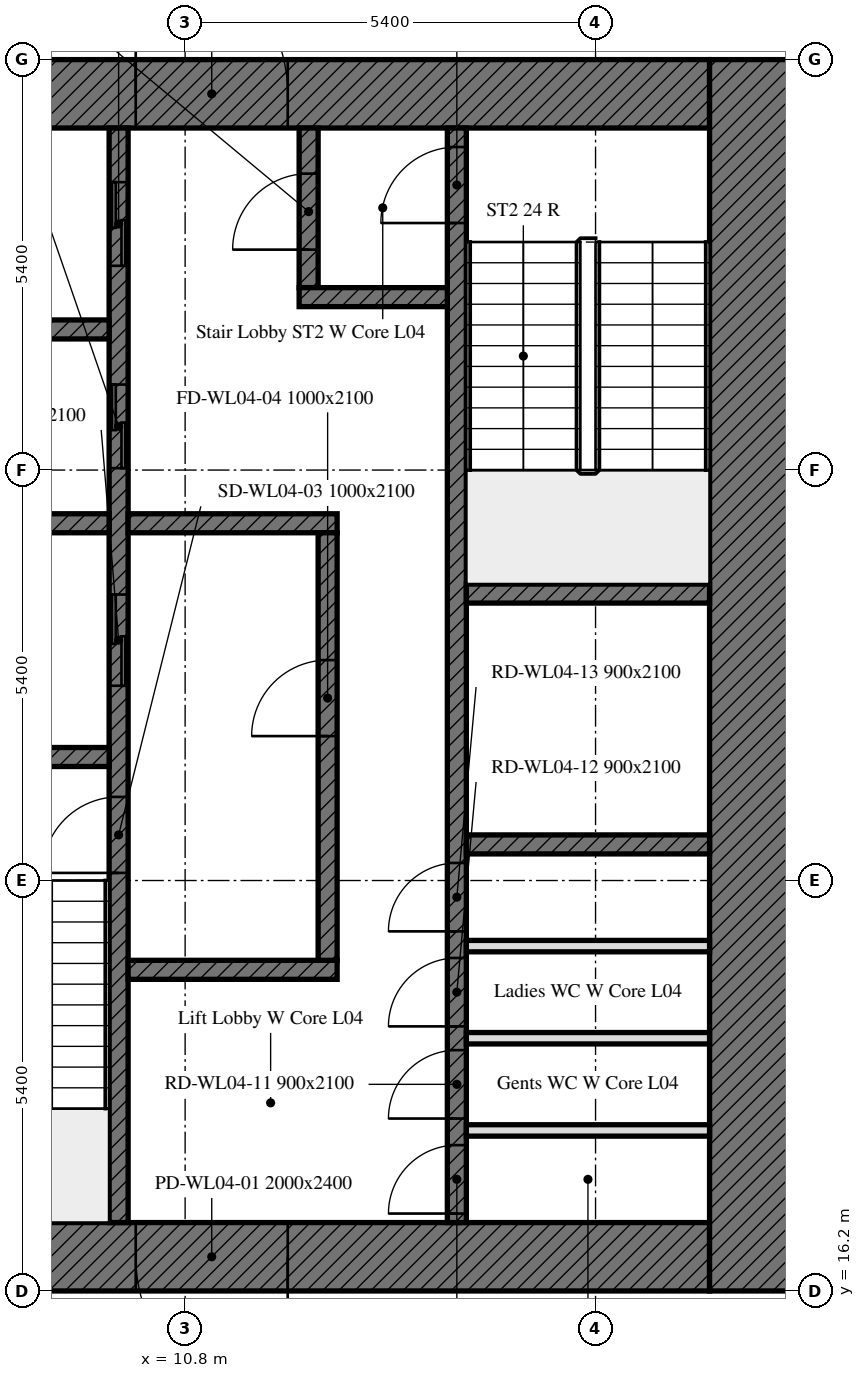
"""IFC4 building model, lengths in metres.
Left out: names, types, materials, properties, quantities, classifications, styles, units other than length and angle.
Written with IfcOpenShell. Run it as: python <this file> out.ifc"""

import sys

from ifc_helpers import new_model, si_unit, direction, frame, frame_2d, origin, place, context, subcontext, project, spatial, rectangle, extrude, element, fill, save


model = new_model("IFC4")
c1 = context("Model", 3, precision=1e-05, world=origin(), true_north=direction((0.0, 1.0)))
c2 = subcontext(c1, "Body", "Model", "MODEL_VIEW")
j1 = project(units=[si_unit("LENGTHUNIT", "METRE"), si_unit("PLANEANGLEUNIT", "RADIAN")], contexts=[c1])
p1 = place(None, origin())
s1 = spatial("IfcSite", under=j1, at=p1, CompositionType="ELEMENT")
p2 = place(p1, origin())
s2 = spatial("IfcBuilding", under=s1, at=p2, CompositionType="ELEMENT")
p3 = place(p2, frame((0.0, 0.0, 24.6)))
s3 = spatial("IfcBuildingStorey", under=s2, at=p3, CompositionType="ELEMENT", Elevation=24.6)
p4 = place(p3, frame((17.7, 16.65, 0.0), z_axis=(0.0, 0.0, 1.0), x_axis=(-1.0, 0.0, 0.0)))
e1 = element("IfcWall", 1, at=p4, inside=s3, PredefinedType="SOLIDWALL", context=c2, shape_type="SweptSolid", body=[
    extrude(rectangle(XDim=11.1, YDim=0.9, at=frame_2d((5.55, 0.0))), origin(), (0.0, 0.0, 1.0), 4.1),
])
p5 = place(p4, frame((5.55, 0.0, 0.0)))
e2 = element("IfcOpeningElement", 2, at=p5, cuts=e1, PredefinedType="OPENING", context=c2, shape_type="SweptSolid", body=[
    extrude(rectangle(XDim=2.0, YDim=2.4, at=frame_2d((1.0, 1.2))), frame((0.0, 0.45, 0.0), z_axis=(0.0, -1.0, 0.0), x_axis=(1.0, 0.0, 0.0)), (0.0, 0.0, 1.0), 0.9),
])
p6 = place(p3, frame((6.6, 31.95, 0.0), z_axis=(0.0, 0.0, 1.0), x_axis=(1.0, 0.0, 0.0)))
e3 = element("IfcWall", 3, at=p6, inside=s3, PredefinedType="SOLIDWALL", context=c2, shape_type="SweptSolid", body=[
    extrude(rectangle(XDim=11.1, YDim=0.9, at=frame_2d((5.55, 0.0))), origin(), (0.0, 0.0, 1.0), 4.1),
])
p7 = place(p6, frame((3.55, 0.0, 0.0)))
e4 = element("IfcOpeningElement", 4, at=p7, cuts=e3, PredefinedType="OPENING", context=c2, shape_type="SweptSolid", body=[
    extrude(rectangle(XDim=2.0, YDim=2.4, at=frame_2d((1.0, 1.2))), frame((0.0, 0.45, 0.0), z_axis=(0.0, -1.0, 0.0), x_axis=(1.0, 0.0, 0.0)), (0.0, 0.0, 1.0), 0.9),
])
p8 = place(p3, frame((18.3, 32.4, 0.0), z_axis=(0.0, 0.0, 1.0), x_axis=(0.0, -1.0, 0.0)))
e5 = element("IfcWall", 5, at=p8, inside=s3, PredefinedType="SOLIDWALL", context=c2, shape_type="SweptSolid", body=[
    extrude(rectangle(XDim=16.2, YDim=1.2, at=frame_2d((8.1, 0.0))), origin(), (0.0, 0.0, 1.0), 4.1),
])
p9 = place(p3, frame((9.925, 17.1, 0.0), z_axis=(0.0, 0.0, 1.0), x_axis=(0.0, 1.0, 0.0)))
e6 = element("IfcWall", 6, at=p9, inside=s3, PredefinedType="SOLIDWALL", context=c2, shape_type="SweptSolid", body=[
    extrude(rectangle(XDim=14.4, YDim=0.25, at=frame_2d((7.2, 0.0))), origin(), (0.0, 0.0, 1.0), 4.1),
])
p10 = place(p9, frame((4.6, 0.0, 0.0)))
e7 = element("IfcOpeningElement", 7, at=p10, cuts=e6, PredefinedType="OPENING", context=c2, shape_type="SweptSolid", body=[
    extrude(rectangle(XDim=1.0, YDim=2.1, at=frame_2d((0.5, 1.05))), frame((0.0, 0.125, 0.0), z_axis=(0.0, -1.0, 0.0), x_axis=(1.0, 0.0, 0.0)), (0.0, 0.0, 1.0), 0.25),
])
p11 = place(p9, frame((7.062, 0.0, 0.0)))
e8 = element("IfcOpeningElement", 8, at=p11, cuts=e6, PredefinedType="OPENING", context=c2, shape_type="SweptSolid", body=[
    extrude(rectangle(XDim=1.2, YDim=2.1, at=frame_2d((0.6, 1.05))), frame((0.0, 0.125, 0.0), z_axis=(0.0, -1.0, 0.0), x_axis=(1.0, 0.0, 0.0)), (0.0, 0.0, 1.0), 0.25),
])
p12 = place(p9, frame((9.925, 0.0, 0.0)))
e9 = element("IfcOpeningElement", 9, at=p12, cuts=e6, PredefinedType="OPENING", context=c2, shape_type="SweptSolid", body=[
    extrude(rectangle(XDim=1.1, YDim=2.1, at=frame_2d((0.55, 1.05))), frame((0.0, 0.125, 0.0), z_axis=(0.0, -1.0, 0.0), x_axis=(1.0, 0.0, 0.0)), (0.0, 0.0, 1.0), 0.25),
])
p13 = place(p9, frame((12.587, 0.0, 0.0)))
e10 = element("IfcOpeningElement", 10, at=p13, cuts=e6, PredefinedType="OPENING", context=c2, shape_type="SweptSolid", body=[
    extrude(rectangle(XDim=1.1, YDim=2.1, at=frame_2d((0.55, 1.05))), frame((0.0, 0.125, 0.0), z_axis=(0.0, -1.0, 0.0), x_axis=(1.0, 0.0, 0.0)), (0.0, 0.0, 1.0), 0.25),
])
p14 = place(p3, frame((14.375, 17.1, 0.0), z_axis=(0.0, 0.0, 1.0), x_axis=(0.0, 1.0, 0.0)))
e11 = element("IfcWall", 11, at=p14, inside=s3, PredefinedType="SOLIDWALL", context=c2, shape_type="SweptSolid", body=[
    extrude(rectangle(XDim=14.4, YDim=0.25, at=frame_2d((7.2, 0.0))), origin(), (0.0, 0.0, 1.0), 4.1),
])
p15 = place(p14, frame((13.15, 0.0, 0.0)))
e12 = element("IfcOpeningElement", 12, at=p15, cuts=e11, PredefinedType="OPENING", context=c2, shape_type="SweptSolid", body=[
    extrude(rectangle(XDim=1.0, YDim=2.1, at=frame_2d((0.5, 1.05))), frame((0.0, 0.125, 0.0), z_axis=(0.0, -1.0, 0.0), x_axis=(1.0, 0.0, 0.0)), (0.0, 0.0, 1.0), 0.25),
])
p16 = place(p14, frame((0.118, 0.0, 0.0)))
e13 = element("IfcOpeningElement", 13, at=p16, cuts=e11, PredefinedType="OPENING", context=c2, shape_type="SweptSolid", body=[
    extrude(rectangle(XDim=0.9, YDim=2.1, at=frame_2d((0.45, 1.05))), frame((0.0, 0.125, 0.0), z_axis=(0.0, -1.0, 0.0), x_axis=(1.0, 0.0, 0.0)), (0.0, 0.0, 1.0), 0.25),
])
p17 = place(p14, frame((1.368, 0.0, 0.0)))
e14 = element("IfcOpeningElement", 14, at=p17, cuts=e11, PredefinedType="OPENING", context=c2, shape_type="SweptSolid", body=[
    extrude(rectangle(XDim=0.9, YDim=2.1, at=frame_2d((0.45, 1.05))), frame((0.0, 0.125, 0.0), z_axis=(0.0, -1.0, 0.0), x_axis=(1.0, 0.0, 0.0)), (0.0, 0.0, 1.0), 0.25),
])
p18 = place(p14, frame((2.581, 0.0, 0.0)))
e15 = element("IfcOpeningElement", 15, at=p18, cuts=e11, PredefinedType="OPENING", context=c2, shape_type="SweptSolid", body=[
    extrude(rectangle(XDim=0.9, YDim=2.1, at=frame_2d((0.45, 1.05))), frame((0.0, 0.125, 0.0), z_axis=(0.0, -1.0, 0.0), x_axis=(1.0, 0.0, 0.0)), (0.0, 0.0, 1.0), 0.25),
])
p19 = place(p14, frame((3.831, 0.0, 0.0)))
e16 = element("IfcOpeningElement", 16, at=p19, cuts=e11, PredefinedType="OPENING", context=c2, shape_type="SweptSolid", body=[
    extrude(rectangle(XDim=0.9, YDim=2.1, at=frame_2d((0.45, 1.05))), frame((0.0, 0.125, 0.0), z_axis=(0.0, -1.0, 0.0), x_axis=(1.0, 0.0, 0.0)), (0.0, 0.0, 1.0), 0.25),
])
for number, where, z_axis, x_axis in (
    (17, (6.6, 23.225, 0.0), (0.0, 0.0, 1.0), (1.0, 0.0, 0.0)),
    (18, (14.5, 25.375, 0.0), (0.0, 0.0, 1.0), (1.0, 0.0, 0.0)),
    (19, (14.5, 22.075, 0.0), (0.0, 0.0, 1.0), (1.0, 0.0, 0.0)),
    (20, (6.6, 26.3, 0.0), (0.0, 0.0, 1.0), (1.0, 0.0, 0.0)),
):
    element("IfcWall", number, at=place(p3, frame(where, z_axis=z_axis, x_axis=x_axis)), inside=s3, PredefinedType="SOLIDWALL", context=c2, shape_type="SweptSolid", body=[
        extrude(rectangle(XDim=3.2, YDim=0.25, at=frame_2d((1.6, 0.0))), origin(), (0.0, 0.0, 1.0), 4.1),
    ])
for number, where, z_axis, x_axis in (
    (21, (10.05, 26.3, 0.0), (0.0, 0.0, 1.0), (1.0, 0.0, 0.0)),
    (22, (10.05, 20.425, 0.0), (0.0, 0.0, 1.0), (1.0, 0.0, 0.0)),
):
    element("IfcWall", number, at=place(p3, frame(where, z_axis=z_axis, x_axis=x_axis)), inside=s3, PredefinedType="SOLIDWALL", context=c2, shape_type="SweptSolid", body=[
        extrude(rectangle(XDim=2.75, YDim=0.25, at=frame_2d((1.375, 0.0))), origin(), (0.0, 0.0, 1.0), 4.1),
    ])
p20 = place(p3, frame((12.425, 29.4, 0.0), z_axis=(0.0, 0.0, 1.0), x_axis=(0.0, 1.0, 0.0)))
e23 = element("IfcWall", 23, at=p20, inside=s3, PredefinedType="SOLIDWALL", context=c2, shape_type="SweptSolid", body=[
    extrude(rectangle(XDim=2.1, YDim=0.25, at=frame_2d((1.05, 0.0))), origin(), (0.0, 0.0, 1.0), 4.1),
])
p21 = place(p20, frame((0.5, 0.0, 0.0)))
e24 = element("IfcOpeningElement", 24, at=p21, cuts=e23, PredefinedType="OPENING", context=c2, shape_type="SweptSolid", body=[
    extrude(rectangle(XDim=1.0, YDim=2.1, at=frame_2d((0.5, 1.05))), frame((0.0, 0.125, 0.0), z_axis=(0.0, -1.0, 0.0), x_axis=(1.0, 0.0, 0.0)), (0.0, 0.0, 1.0), 0.25),
])
p22 = place(p3, frame((12.3, 29.275, 0.0), z_axis=(0.0, 0.0, 1.0), x_axis=(1.0, 0.0, 0.0)))
e25 = element("IfcWall", 25, at=p22, inside=s3, PredefinedType="SOLIDWALL", context=c2, shape_type="SweptSolid", body=[
    extrude(rectangle(XDim=1.95, YDim=0.25, at=frame_2d((0.975, 0.0))), origin(), (0.0, 0.0, 1.0), 4.1),
])
p23 = place(p3, frame((12.675, 20.55, 0.0), z_axis=(0.0, 0.0, 1.0), x_axis=(0.0, 1.0, 0.0)))
e26 = element("IfcWall", 26, at=p23, inside=s3, PredefinedType="SOLIDWALL", context=c2, shape_type="SweptSolid", body=[
    extrude(rectangle(XDim=5.625, YDim=0.25, at=frame_2d((2.812, 0.0))), origin(), (0.0, 0.0, 1.0), 4.1),
])
p24 = place(p23, frame((2.95, 0.0, 0.0)))
e27 = element("IfcOpeningElement", 27, at=p24, cuts=e26, PredefinedType="OPENING", context=c2, shape_type="SweptSolid", body=[
    extrude(rectangle(XDim=1.0, YDim=2.1, at=frame_2d((0.5, 1.05))), frame((0.0, 0.125, 0.0), z_axis=(0.0, -1.0, 0.0), x_axis=(1.0, 0.0, 0.0)), (0.0, 0.0, 1.0), 0.25),
])
p25 = place(p3, frame((6.6, 28.85, 0.0), z_axis=(0.0, 0.0, 1.0), x_axis=(1.0, 0.0, 0.0)))
e28 = element("IfcWall", 28, at=p25, inside=s3, PredefinedType="SOLIDWALL", context=c2, shape_type="SweptSolid", body=[
    extrude(rectangle(XDim=3.2, YDim=0.25, at=frame_2d((1.6, 0.0))), origin(), (0.0, 0.0, 1.0), 4.1),
])
for number, where, z_axis, x_axis in (
    (29, (14.5, 18.312, 0.0), (0.0, 0.0, 1.0), (1.0, 0.0, 0.0)),
    (30, (14.5, 19.525, 0.0), (0.0, 0.0, 1.0), (1.0, 0.0, 0.0)),
    (31, (14.5, 20.737, 0.0), (0.0, 0.0, 1.0), (1.0, 0.0, 0.0)),
):
    element("IfcWall", number, at=place(p3, frame(where, z_axis=z_axis, x_axis=x_axis)), inside=s3, PredefinedType="PARTITIONING", context=c2, shape_type="SweptSolid", body=[
        extrude(rectangle(XDim=3.2, YDim=0.15, at=frame_2d((1.6, 0.0))), origin(), (0.0, 0.0, 1.0), 4.1),
    ])
p26 = place(p5, origin())
e32 = element("IfcDoor", 32, at=p26, inside=s3, OperationType="DOUBLE_DOOR_SINGLE_SWING", PredefinedType="DOOR", context=c2, shape_type="SweptSolid", body=[
    extrude(rectangle(XDim=2.0, YDim=2.4, at=frame_2d((1.0, 1.2))), frame((0.0, 0.025, 0.0), z_axis=(0.0, -1.0, 0.0), x_axis=(1.0, 0.0, 0.0)), (0.0, 0.0, 1.0), 0.05),
])
fill(e2, e32)
p27 = place(p7, origin())
e33 = element("IfcDoor", 33, at=p27, inside=s3, OperationType="DOUBLE_DOOR_SINGLE_SWING", PredefinedType="DOOR", context=c2, shape_type="SweptSolid", body=[
    extrude(rectangle(XDim=2.0, YDim=2.4, at=frame_2d((1.0, 1.2))), frame((0.0, 0.025, 0.0), z_axis=(0.0, -1.0, 0.0), x_axis=(1.0, 0.0, 0.0)), (0.0, 0.0, 1.0), 0.05),
])
fill(e4, e33)
p28 = place(p10, origin())
e34 = element("IfcDoor", 34, at=p28, inside=s3, OperationType="SINGLE_SWING_LEFT", PredefinedType="DOOR", context=c2, shape_type="SweptSolid", body=[
    extrude(rectangle(XDim=1.0, YDim=2.1, at=frame_2d((0.5, 1.05))), frame((0.0, 0.025, 0.0), z_axis=(0.0, -1.0, 0.0), x_axis=(1.0, 0.0, 0.0)), (0.0, 0.0, 1.0), 0.05),
])
fill(e7, e34)
p29 = place(p24, origin())
e35 = element("IfcDoor", 35, at=p29, inside=s3, OperationType="SINGLE_SWING_LEFT", PredefinedType="DOOR", context=c2, shape_type="SweptSolid", body=[
    extrude(rectangle(XDim=1.0, YDim=2.1, at=frame_2d((0.5, 1.05))), frame((0.0, 0.025, 0.0), z_axis=(0.0, -1.0, 0.0), x_axis=(1.0, 0.0, 0.0)), (0.0, 0.0, 1.0), 0.05),
])
fill(e27, e35)
p30 = place(p15, origin())
e36 = element("IfcDoor", 36, at=p30, inside=s3, OperationType="SINGLE_SWING_LEFT", PredefinedType="DOOR", context=c2, shape_type="SweptSolid", body=[
    extrude(rectangle(XDim=1.0, YDim=2.1, at=frame_2d((0.5, 1.05))), frame((0.0, 0.025, 0.0), z_axis=(0.0, -1.0, 0.0), x_axis=(1.0, 0.0, 0.0)), (0.0, 0.0, 1.0), 0.05),
])
fill(e12, e36)
p31 = place(p21, origin())
e37 = element("IfcDoor", 37, at=p31, inside=s3, OperationType="SINGLE_SWING_LEFT", PredefinedType="DOOR", context=c2, shape_type="SweptSolid", body=[
    extrude(rectangle(XDim=1.0, YDim=2.1, at=frame_2d((0.5, 1.05))), frame((0.0, 0.025, 0.0), z_axis=(0.0, -1.0, 0.0), x_axis=(1.0, 0.0, 0.0)), (0.0, 0.0, 1.0), 0.05),
])
fill(e24, e37)
p32 = place(p11, origin())
e38 = element("IfcDoor", 38, at=p32, inside=s3, OperationType="DOUBLE_DOOR_SLIDING", PredefinedType="DOOR", context=c2, shape_type="SweptSolid", body=[
    extrude(rectangle(XDim=1.2, YDim=2.1, at=frame_2d((0.6, 1.05))), frame((0.0, 0.025, 0.0), z_axis=(0.0, -1.0, 0.0), x_axis=(1.0, 0.0, 0.0)), (0.0, 0.0, 1.0), 0.05),
])
fill(e8, e38)
p33 = place(p12, origin())
e39 = element("IfcDoor", 39, at=p33, inside=s3, OperationType="DOUBLE_DOOR_SLIDING", PredefinedType="DOOR", context=c2, shape_type="SweptSolid", body=[
    extrude(rectangle(XDim=1.1, YDim=2.1, at=frame_2d((0.55, 1.05))), frame((0.0, 0.025, 0.0), z_axis=(0.0, -1.0, 0.0), x_axis=(1.0, 0.0, 0.0)), (0.0, 0.0, 1.0), 0.05),
])
fill(e9, e39)
p34 = place(p13, origin())
e40 = element("IfcDoor", 40, at=p34, inside=s3, OperationType="DOUBLE_DOOR_SLIDING", PredefinedType="DOOR", context=c2, shape_type="SweptSolid", body=[
    extrude(rectangle(XDim=1.1, YDim=2.1, at=frame_2d((0.55, 1.05))), frame((0.0, 0.025, 0.0), z_axis=(0.0, -1.0, 0.0), x_axis=(1.0, 0.0, 0.0)), (0.0, 0.0, 1.0), 0.05),
])
fill(e10, e40)
p35 = place(p16, origin())
e41 = element("IfcDoor", 41, at=p35, inside=s3, OperationType="SINGLE_SWING_LEFT", PredefinedType="DOOR", context=c2, shape_type="SweptSolid", body=[
    extrude(rectangle(XDim=0.9, YDim=2.1, at=frame_2d((0.45, 1.05))), frame((0.0, 0.025, 0.0), z_axis=(0.0, -1.0, 0.0), x_axis=(1.0, 0.0, 0.0)), (0.0, 0.0, 1.0), 0.05),
])
fill(e13, e41)
p36 = place(p17, origin())
e42 = element("IfcDoor", 42, at=p36, inside=s3, OperationType="SINGLE_SWING_LEFT", PredefinedType="DOOR", context=c2, shape_type="SweptSolid", body=[
    extrude(rectangle(XDim=0.9, YDim=2.1, at=frame_2d((0.45, 1.05))), frame((0.0, 0.025, 0.0), z_axis=(0.0, -1.0, 0.0), x_axis=(1.0, 0.0, 0.0)), (0.0, 0.0, 1.0), 0.05),
])
fill(e14, e42)
p37 = place(p18, origin())
e43 = element("IfcDoor", 43, at=p37, inside=s3, OperationType="SINGLE_SWING_LEFT", PredefinedType="DOOR", context=c2, shape_type="SweptSolid", body=[
    extrude(rectangle(XDim=0.9, YDim=2.1, at=frame_2d((0.45, 1.05))), frame((0.0, 0.025, 0.0), z_axis=(0.0, -1.0, 0.0), x_axis=(1.0, 0.0, 0.0)), (0.0, 0.0, 1.0), 0.05),
])
fill(e15, e43)
p38 = place(p19, origin())
e44 = element("IfcDoor", 44, at=p38, inside=s3, OperationType="SINGLE_SWING_LEFT", PredefinedType="DOOR", context=c2, shape_type="SweptSolid", body=[
    extrude(rectangle(XDim=0.9, YDim=2.1, at=frame_2d((0.45, 1.05))), frame((0.0, 0.025, 0.0), z_axis=(0.0, -1.0, 0.0), x_axis=(1.0, 0.0, 0.0)), (0.0, 0.0, 1.0), 0.05),
])
fill(e16, e44)
save(model, sys.argv[1])
